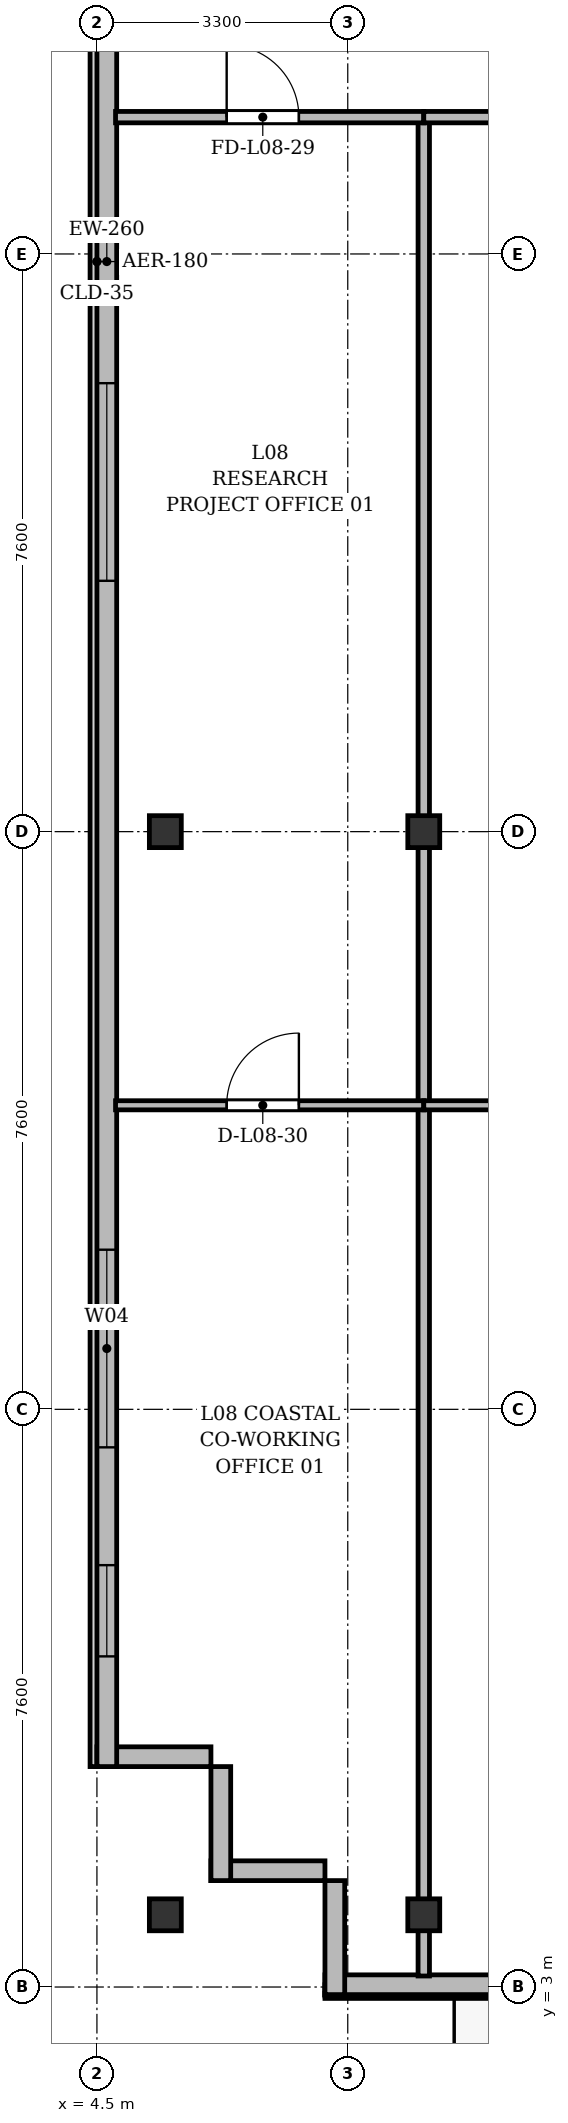
"""IFC4 building model, lengths in metres.
Left out: names, types, materials, properties, quantities, classifications, styles, units other than length and angle.
Written with IfcOpenShell. Run it as: python <this file> out.ifc"""

import sys

from ifc_helpers import new_model, si_unit, direction, frame, frame_2d, origin, origin_2d, place, context, subcontext, project, spatial, rectangle, i_section, extrude, source, transform, mapped, element, fill, save


model = new_model("IFC4")
c1 = context("Model", 3, precision=1e-05, world=origin(), true_north=direction((0.0, 1.0)))
c2 = subcontext(c1, "Body", "Model", "MODEL_VIEW")
j1 = project(units=[si_unit("LENGTHUNIT", "METRE"), si_unit("PLANEANGLEUNIT", "RADIAN")], contexts=[c1])
p1 = place(None, origin())
s1 = spatial("IfcSite", under=j1, at=p1, CompositionType="ELEMENT")
p2 = place(p1, origin())
s2 = spatial("IfcBuilding", under=s1, at=p2, CompositionType="ELEMENT")
p3 = place(p2, frame((0.0, 0.0, 34.3)))
s3 = spatial("IfcBuildingStorey", under=s2, at=p3, CompositionType="ELEMENT", Elevation=34.3)
m1 = source(origin(), c2, "Body", "SweptSolid", [
    extrude(i_section(OverallWidth=0.42, OverallDepth=0.42, WebThickness=0.026, FlangeThickness=0.04, at=origin_2d()), origin(), (0.0, 0.0, 1.0), 3.6),
])
for number, where, z_axis, x_axis in (
    (1, (5.4, 3.95, 0.0), (0.0, 0.0, 1.0), (1.0, 0.0, 0.0)),
    (2, (5.4, 18.2, 0.0), (0.0, 0.0, 1.0), (1.0, 0.0, 0.0)),
    (3, (8.8, 3.95, 0.0), (0.0, 0.0, 1.0), (1.0, 0.0, 0.0)),
    (4, (8.8, 18.2, 0.0), (0.0, 0.0, 1.0), (1.0, 0.0, 0.0)),
):
    element("IfcColumn", number, at=place(p3, frame(where, z_axis=z_axis, x_axis=x_axis)), inside=s3, PredefinedType="COLUMN", context=c2, shape_type="MappedRepresentation", body=[
        mapped(m1, transform((0.0, 0.0, 0.0), x_axis=(1.0, 0.0, 0.0), y_axis=(0.0, 1.0, 0.0), z_axis=(0.0, 0.0, 1.0), scale=1.0)),
    ])
for number, where, z_axis, x_axis in (
    (5, (7.5, 4.53, 0.0), (0.0, 0.0, 1.0), (-1.0, 0.0, 0.0)),
    (6, (6.13, 4.4, 0.0), (0.0, 0.0, 1.0), (0.0, 1.0, 0.0)),
):
    element("IfcWall", number, at=place(p3, frame(where, z_axis=z_axis, x_axis=x_axis)), inside=s3, PredefinedType="SOLIDWALL", context=c2, shape_type="SweptSolid", body=[
        extrude(rectangle(XDim=1.5, YDim=0.26, at=frame_2d((0.75, 0.0))), origin(), (0.0, 0.0, 1.0), 3.34),
    ])
p4 = place(p3, frame((6.0, 6.03, 0.0), z_axis=(0.0, 0.0, 1.0), x_axis=(-1.0, 0.0, 0.0)))
e7 = element("IfcWall", 7, at=p4, inside=s3, PredefinedType="SOLIDWALL", context=c2, shape_type="SweptSolid", body=[
    extrude(rectangle(XDim=1.5, YDim=0.26, at=frame_2d((0.75, 0.0))), origin(), (0.0, 0.0, 1.0), 2.752),
])
p5 = place(p3, frame((4.63, 5.9, 0.0), z_axis=(0.0, 0.0, 1.0), x_axis=(0.0, 1.0, 0.0)))
e8 = element("IfcWall", 8, at=p5, inside=s3, PredefinedType="SOLIDWALL", context=c2, shape_type="SweptSolid", body=[
    extrude(rectangle(XDim=39.6, YDim=0.26, at=frame_2d((19.8, 0.0))), origin(), (0.0, 0.0, 1.0), 3.34),
])
p6 = place(p5, frame((1.45, 0.0, 0.92)))
e9 = element("IfcOpeningElement", 9, at=p6, cuts=e8, PredefinedType="OPENING", context=c2, shape_type="SweptSolid", body=[
    extrude(rectangle(XDim=1.2, YDim=1.65, at=frame_2d((0.6, 0.825))), frame((0.0, 0.14, 0.0), z_axis=(0.0, -1.0, 0.0), x_axis=(1.0, 0.0, 0.0)), (0.0, 0.0, 1.0), 0.28),
])
p7 = place(p5, frame((4.2, 0.0, 0.92)))
e10 = element("IfcOpeningElement", 10, at=p7, cuts=e8, PredefinedType="OPENING", context=c2, shape_type="SweptSolid", body=[
    extrude(rectangle(XDim=2.6, YDim=1.9, at=frame_2d((1.3, 0.95))), frame((0.0, 0.14, 0.0), z_axis=(0.0, -1.0, 0.0), x_axis=(1.0, 0.0, 0.0)), (0.0, 0.0, 1.0), 0.28),
])
p8 = place(p5, frame((15.6, 0.0, 0.92)))
e11 = element("IfcOpeningElement", 11, at=p8, cuts=e8, PredefinedType="OPENING", context=c2, shape_type="SweptSolid", body=[
    extrude(rectangle(XDim=2.6, YDim=1.9, at=frame_2d((1.3, 0.95))), frame((0.0, 0.14, 0.0), z_axis=(0.0, -1.0, 0.0), x_axis=(1.0, 0.0, 0.0)), (0.0, 0.0, 1.0), 0.28),
])
p9 = place(p5, frame((29.6, 0.0, 0.92)))
e12 = element("IfcOpeningElement", 12, at=p9, cuts=e8, PredefinedType="OPENING", context=c2, shape_type="SweptSolid", body=[
    extrude(rectangle(XDim=2.6, YDim=1.9, at=frame_2d((1.3, 0.95))), frame((0.0, 0.14, 0.0), z_axis=(0.0, -1.0, 0.0), x_axis=(1.0, 0.0, 0.0)), (0.0, 0.0, 1.0), 0.28),
])
p10 = place(p5, frame((33.9, 0.0, 0.92)))
e13 = element("IfcOpeningElement", 13, at=p10, cuts=e8, PredefinedType="OPENING", context=c2, shape_type="SweptSolid", body=[
    extrude(rectangle(XDim=1.2, YDim=1.65, at=frame_2d((0.6, 0.825))), frame((0.0, 0.14, 0.0), z_axis=(0.0, -1.0, 0.0), x_axis=(1.0, 0.0, 0.0)), (0.0, 0.0, 1.0), 0.28),
])
p11 = place(p5, frame((37.25, 0.0, 0.92)))
e14 = element("IfcOpeningElement", 14, at=p11, cuts=e8, PredefinedType="OPENING", context=c2, shape_type="SweptSolid", body=[
    extrude(rectangle(XDim=1.2, YDim=1.65, at=frame_2d((0.6, 0.825))), frame((0.0, 0.14, 0.0), z_axis=(0.0, -1.0, 0.0), x_axis=(1.0, 0.0, 0.0)), (0.0, 0.0, 1.0), 0.28),
])
p12 = place(p3, frame((66.9, 3.03, 0.0), z_axis=(0.0, 0.0, 1.0), x_axis=(-1.0, 0.0, 0.0)))
e15 = element("IfcWall", 15, at=p12, inside=s3, PredefinedType="SOLIDWALL", context=c2, shape_type="SweptSolid", body=[
    extrude(rectangle(XDim=59.4, YDim=0.26, at=frame_2d((29.7, 0.0))), origin(), (0.0, 0.0, 1.0), 3.34),
])
p13 = place(p12, frame((3.875, 0.0, 0.9)))
e16 = element("IfcOpeningElement", 16, at=p13, cuts=e15, PredefinedType="OPENING", context=c2, shape_type="SweptSolid", body=[
    extrude(rectangle(XDim=1.65, YDim=1.85, at=frame_2d((0.825, 0.925))), frame((0.0, 0.14, 0.0), z_axis=(0.0, -1.0, 0.0), x_axis=(1.0, 0.0, 0.0)), (0.0, 0.0, 1.0), 0.28),
])
p14 = place(p12, frame((9.565, 0.0, 0.0)))
e17 = element("IfcOpeningElement", 17, at=p14, cuts=e15, PredefinedType="OPENING", context=c2, shape_type="SweptSolid", body=[
    extrude(rectangle(XDim=1.2, YDim=2.2, at=frame_2d((0.6, 1.1))), frame((0.0, 0.14, 0.0), z_axis=(0.0, -1.0, 0.0), x_axis=(1.0, 0.0, 0.0)), (0.0, 0.0, 1.0), 0.28),
])
p15 = place(p12, frame((18.4, 0.0, 0.9)))
e18 = element("IfcOpeningElement", 18, at=p15, cuts=e15, PredefinedType="OPENING", context=c2, shape_type="SweptSolid", body=[
    extrude(rectangle(XDim=2.2, YDim=1.8, at=frame_2d((1.1, 0.9))), frame((0.0, 0.14, 0.0), z_axis=(0.0, -1.0, 0.0), x_axis=(1.0, 0.0, 0.0)), (0.0, 0.0, 1.0), 0.28),
])
p16 = place(p12, frame((28.95, 0.0, 0.9)))
e19 = element("IfcOpeningElement", 19, at=p16, cuts=e15, PredefinedType="OPENING", context=c2, shape_type="SweptSolid", body=[
    extrude(rectangle(XDim=1.5, YDim=1.75, at=frame_2d((0.75, 0.875))), frame((0.0, 0.14, 0.0), z_axis=(0.0, -1.0, 0.0), x_axis=(1.0, 0.0, 0.0)), (0.0, 0.0, 1.0), 0.28),
])
p17 = place(p12, frame((40.301, 0.0, 0.0)))
e20 = element("IfcOpeningElement", 20, at=p17, cuts=e15, PredefinedType="OPENING", context=c2, shape_type="SweptSolid", body=[
    extrude(rectangle(XDim=1.2, YDim=2.2, at=frame_2d((0.6, 1.1))), frame((0.0, 0.14, 0.0), z_axis=(0.0, -1.0, 0.0), x_axis=(1.0, 0.0, 0.0)), (0.0, 0.0, 1.0), 0.28),
])
p18 = place(p12, frame((46.575, 0.0, 0.9)))
e21 = element("IfcOpeningElement", 21, at=p18, cuts=e15, PredefinedType="OPENING", context=c2, shape_type="SweptSolid", body=[
    extrude(rectangle(XDim=1.65, YDim=1.85, at=frame_2d((0.825, 0.925))), frame((0.0, 0.14, 0.0), z_axis=(0.0, -1.0, 0.0), x_axis=(1.0, 0.0, 0.0)), (0.0, 0.0, 1.0), 0.28),
])
p19 = place(p12, frame((55.817, 0.0, 0.0)))
e22 = element("IfcOpeningElement", 22, at=p19, cuts=e15, PredefinedType="OPENING", context=c2, shape_type="SweptSolid", body=[
    extrude(rectangle(XDim=1.2, YDim=2.2, at=frame_2d((0.6, 1.1))), frame((0.0, 0.14, 0.0), z_axis=(0.0, -1.0, 0.0), x_axis=(1.0, 0.0, 0.0)), (0.0, 0.0, 1.0), 0.28),
])
p20 = place(p3, frame((7.63, 2.9, 0.0), z_axis=(0.0, 0.0, 1.0), x_axis=(0.0, 1.0, 0.0)))
e23 = element("IfcWall", 23, at=p20, inside=s3, PredefinedType="SOLIDWALL", context=c2, shape_type="SweptSolid", body=[
    extrude(rectangle(XDim=1.5, YDim=0.26, at=frame_2d((0.75, 0.0))), origin(), (0.0, 0.0, 1.0), 2.69),
])
p21 = place(p3, frame((8.8, 3.145, 0.0), z_axis=(0.0, 0.0, 1.0), x_axis=(0.0, 1.0, 0.0)))
e24 = element("IfcWall", 24, at=p21, inside=s3, PredefinedType="PARTITIONING", context=c2, shape_type="SweptSolid", body=[
    extrude(rectangle(XDim=24.455, YDim=0.15, at=frame_2d((12.228, 0.0))), origin(), (0.0, 0.0, 1.0), 2.752),
])
p22 = place(p3, frame((4.745, 27.6, 0.0), z_axis=(0.0, 0.0, 1.0), x_axis=(1.0, 0.0, 0.0)))
e25 = element("IfcWall", 25, at=p22, inside=s3, PredefinedType="PARTITIONING", context=c2, shape_type="SweptSolid", body=[
    extrude(rectangle(XDim=4.055, YDim=0.15, at=frame_2d((2.027, 0.0))), origin(), (0.0, 0.0, 1.0), 2.752),
])
p23 = place(p22, frame((1.462, 0.0, 0.0)))
e26 = element("IfcOpeningElement", 26, at=p23, cuts=e25, PredefinedType="OPENING", context=c2, shape_type="SweptSolid", body=[
    extrude(rectangle(XDim=0.95, YDim=2.15, at=frame_2d((0.475, 1.075))), frame((0.0, 0.085, 0.0), z_axis=(0.0, -1.0, 0.0), x_axis=(1.0, 0.0, 0.0)), (0.0, 0.0, 1.0), 0.17),
])
p24 = place(p3, frame((4.745, 14.6, 0.0), z_axis=(0.0, 0.0, 1.0), x_axis=(1.0, 0.0, 0.0)))
e27 = element("IfcWall", 27, at=p24, inside=s3, PredefinedType="PARTITIONING", context=c2, shape_type="SweptSolid", body=[
    extrude(rectangle(XDim=4.055, YDim=0.12, at=frame_2d((2.027, 0.0))), origin(), (0.0, 0.0, 1.0), 2.752),
])
p25 = place(p24, frame((1.462, 0.0, 0.0)))
e28 = element("IfcOpeningElement", 28, at=p25, cuts=e27, PredefinedType="OPENING", context=c2, shape_type="SweptSolid", body=[
    extrude(rectangle(XDim=0.95, YDim=2.15, at=frame_2d((0.475, 1.075))), frame((0.0, 0.07, 0.0), z_axis=(0.0, -1.0, 0.0), x_axis=(1.0, 0.0, 0.0)), (0.0, 0.0, 1.0), 0.14),
])
p26 = place(p3, frame((8.8, 27.6, 0.0), z_axis=(0.0, 0.0, 1.0), x_axis=(1.0, 0.0, 0.0)))
e29 = element("IfcWall", 29, at=p26, inside=s3, PredefinedType="PARTITIONING", context=c2, shape_type="SweptSolid", body=[
    extrude(rectangle(XDim=6.8, YDim=0.15, at=frame_2d((3.4, 0.0))), origin(), (0.0, 0.0, 1.0), 2.752),
])
p27 = place(p26, frame((2.925, 0.0, 0.0)))
e30 = element("IfcOpeningElement", 30, at=p27, cuts=e29, PredefinedType="OPENING", context=c2, shape_type="SweptSolid", body=[
    extrude(rectangle(XDim=0.95, YDim=2.15, at=frame_2d((0.475, 1.075))), frame((0.0, 0.085, 0.0), z_axis=(0.0, -1.0, 0.0), x_axis=(1.0, 0.0, 0.0)), (0.0, 0.0, 1.0), 0.17),
])
p28 = place(p3, frame((8.8, 14.6, 0.0), z_axis=(0.0, 0.0, 1.0), x_axis=(1.0, 0.0, 0.0)))
e31 = element("IfcWall", 31, at=p28, inside=s3, PredefinedType="PARTITIONING", context=c2, shape_type="SweptSolid", body=[
    extrude(rectangle(XDim=6.8, YDim=0.12, at=frame_2d((3.4, 0.0))), origin(), (0.0, 0.0, 1.0), 2.752),
])
p29 = place(p28, frame((2.925, 0.0, 0.0)))
e32 = element("IfcOpeningElement", 32, at=p29, cuts=e31, PredefinedType="OPENING", context=c2, shape_type="SweptSolid", body=[
    extrude(rectangle(XDim=0.95, YDim=2.15, at=frame_2d((0.475, 1.075))), frame((0.0, 0.07, 0.0), z_axis=(0.0, -1.0, 0.0), x_axis=(1.0, 0.0, 0.0)), (0.0, 0.0, 1.0), 0.14),
])
m2 = source(origin(), c2, "Body", "SweptSolid", [
    extrude(rectangle(XDim=1.2, YDim=1.65, at=frame_2d((0.6, 0.825))), frame((0.0, 0.03, 0.0), z_axis=(0.0, -1.0, 0.0), x_axis=(1.0, 0.0, 0.0)), (0.0, 0.0, 1.0), 0.06),
])
p30 = place(p6, origin())
e33 = element("IfcWindow", 33, at=p30, inside=s3, PartitioningType="SINGLE_PANEL", PredefinedType="WINDOW", context=c2, shape_type="MappedRepresentation", body=[
    mapped(m2, transform((0.0, 0.0, 0.0), x_axis=(1.0, 0.0, 0.0), y_axis=(0.0, 1.0, 0.0), z_axis=(0.0, 0.0, 1.0), scale=1.0)),
])
fill(e9, e33)
m3 = source(origin(), c2, "Body", "SweptSolid", [
    extrude(rectangle(XDim=2.6, YDim=1.9, at=frame_2d((1.3, 0.95))), frame((0.0, 0.03, 0.0), z_axis=(0.0, -1.0, 0.0), x_axis=(1.0, 0.0, 0.0)), (0.0, 0.0, 1.0), 0.06),
])
p31 = place(p7, origin())
e34 = element("IfcWindow", 34, at=p31, inside=s3, PartitioningType="SINGLE_PANEL", PredefinedType="WINDOW", context=c2, shape_type="MappedRepresentation", body=[
    mapped(m3, transform((0.0, 0.0, 0.0), x_axis=(1.0, 0.0, 0.0), y_axis=(0.0, 1.0, 0.0), z_axis=(0.0, 0.0, 1.0), scale=1.0)),
])
fill(e10, e34)
p32 = place(p8, origin())
e35 = element("IfcWindow", 35, at=p32, inside=s3, PartitioningType="SINGLE_PANEL", PredefinedType="WINDOW", context=c2, shape_type="MappedRepresentation", body=[
    mapped(m3, transform((0.0, 0.0, 0.0), x_axis=(1.0, 0.0, 0.0), y_axis=(0.0, 1.0, 0.0), z_axis=(0.0, 0.0, 1.0), scale=1.0)),
])
fill(e11, e35)
m4 = source(origin(), c2, "Body", "SweptSolid", [
    extrude(rectangle(XDim=0.95, YDim=2.15, at=frame_2d((0.475, 1.075))), frame((0.0, 0.025, 0.0), z_axis=(0.0, -1.0, 0.0), x_axis=(1.0, 0.0, 0.0)), (0.0, 0.0, 1.0), 0.05),
])
p33 = place(p23, origin())
e36 = element("IfcDoor", 36, at=p33, inside=s3, OperationType="SINGLE_SWING_LEFT", PredefinedType="DOOR", context=c2, shape_type="MappedRepresentation", body=[
    mapped(m4, transform((0.0, 0.0, 0.0), x_axis=(1.0, 0.0, 0.0), y_axis=(0.0, 1.0, 0.0), z_axis=(0.0, 0.0, 1.0), scale=1.0)),
])
fill(e26, e36)
p34 = place(p25, origin())
e37 = element("IfcDoor", 37, at=p34, inside=s3, OperationType="SINGLE_SWING_RIGHT", PredefinedType="DOOR", context=c2, shape_type="MappedRepresentation", body=[
    mapped(m4, transform((0.0, 0.0, 0.0), x_axis=(1.0, 0.0, 0.0), y_axis=(0.0, 1.0, 0.0), z_axis=(0.0, 0.0, 1.0), scale=1.0)),
])
fill(e28, e37)
save(model, sys.argv[1])
